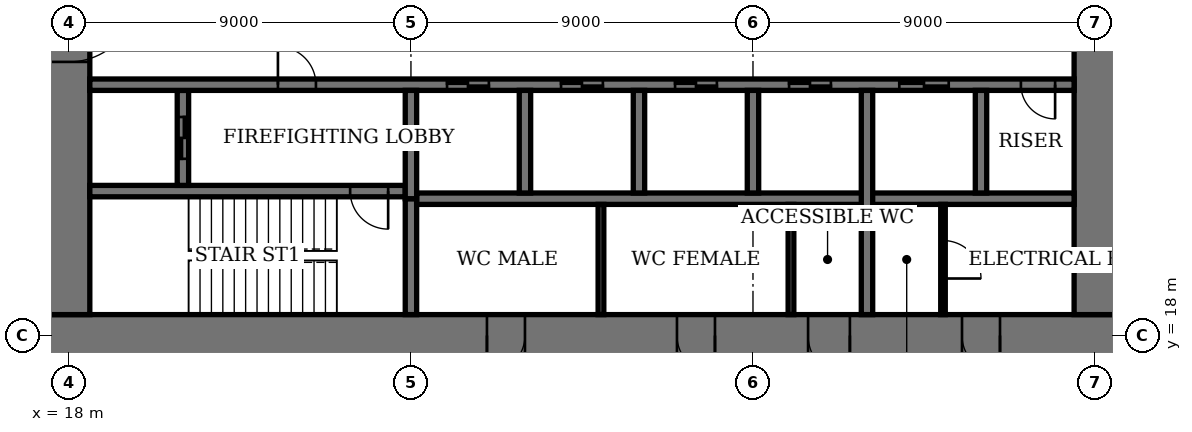
"""IFC4 building model, lengths in metres.
Left out: names, types, materials, properties, quantities, classifications, styles, units other than length and angle.
Written with IfcOpenShell. Run it as: python <this file> out.ifc"""

import sys

from ifc_helpers import new_model, si_unit, direction, frame, frame_2d, origin, place, context, subcontext, project, spatial, rectangle, extrude, element, fill, save


model = new_model("IFC4")
c1 = context("Model", 3, precision=1e-05, world=origin(), true_north=direction((0.0, 1.0)))
c2 = subcontext(c1, "Body", "Model", "MODEL_VIEW")
j1 = project(units=[si_unit("LENGTHUNIT", "METRE"), si_unit("PLANEANGLEUNIT", "RADIAN")], contexts=[c1])
p1 = place(None, origin())
s1 = spatial("IfcSite", under=j1, at=p1, CompositionType="ELEMENT")
p2 = place(p1, origin())
s2 = spatial("IfcBuilding", under=s1, at=p2, CompositionType="ELEMENT")
p3 = place(p2, frame((0.0, 0.0, 275.4)))
s3 = spatial("IfcBuildingStorey", under=s2, at=p3, CompositionType="ELEMENT", Elevation=275.4)
p4 = place(p3, frame((17.45, 18.0, 0.0), z_axis=(0.0, 0.0, 1.0), x_axis=(1.0, 0.0, 0.0)))
e1 = element("IfcWall", 1, at=p4, inside=s3, PredefinedType="SHEAR", context=c2, shape_type="SweptSolid", body=[
    extrude(rectangle(XDim=28.1, YDim=1.1, at=frame_2d((14.05, 0.0))), origin(), (0.0, 0.0, 1.0), 4.0),
])
p5 = place(p4, frame((11.55, 0.0, 0.0)))
e2 = element("IfcOpeningElement", 2, at=p5, cuts=e1, PredefinedType="OPENING", context=c2, shape_type="SweptSolid", body=[
    extrude(rectangle(XDim=1.0, YDim=2.4, at=frame_2d((0.5, 1.2))), frame((0.0, 0.56, 0.0), z_axis=(0.0, -1.0, 0.0), x_axis=(1.0, 0.0, 0.0)), (0.0, 0.0, 1.0), 1.12),
])
p6 = place(p4, frame((16.55, 0.0, 0.0)))
e3 = element("IfcOpeningElement", 3, at=p6, cuts=e1, PredefinedType="OPENING", context=c2, shape_type="SweptSolid", body=[
    extrude(rectangle(XDim=1.0, YDim=2.4, at=frame_2d((0.5, 1.2))), frame((0.0, 0.56, 0.0), z_axis=(0.0, -1.0, 0.0), x_axis=(1.0, 0.0, 0.0)), (0.0, 0.0, 1.0), 1.12),
])
p7 = place(p4, frame((20.0, 0.0, 0.0)))
e4 = element("IfcOpeningElement", 4, at=p7, cuts=e1, PredefinedType="OPENING", context=c2, shape_type="SweptSolid", body=[
    extrude(rectangle(XDim=1.1, YDim=2.4, at=frame_2d((0.55, 1.2))), frame((0.0, 0.56, 0.0), z_axis=(0.0, -1.0, 0.0), x_axis=(1.0, 0.0, 0.0)), (0.0, 0.0, 1.0), 1.12),
])
p8 = place(p4, frame((24.05, 0.0, 0.0)))
e5 = element("IfcOpeningElement", 5, at=p8, cuts=e1, PredefinedType="OPENING", context=c2, shape_type="SweptSolid", body=[
    extrude(rectangle(XDim=1.0, YDim=2.4, at=frame_2d((0.5, 1.2))), frame((0.0, 0.56, 0.0), z_axis=(0.0, -1.0, 0.0), x_axis=(1.0, 0.0, 0.0)), (0.0, 0.0, 1.0), 1.12),
])
p9 = place(p3, frame((18.0, 35.45, 0.0), z_axis=(0.0, 0.0, 1.0), x_axis=(0.0, -1.0, 0.0)))
e6 = element("IfcWall", 6, at=p9, inside=s3, PredefinedType="SHEAR", context=c2, shape_type="SweptSolid", body=[
    extrude(rectangle(XDim=16.9, YDim=1.1, at=frame_2d((8.45, 0.0))), origin(), (0.0, 0.0, 1.0), 4.0),
])
p10 = place(p9, frame((8.45, 0.0, 0.0)))
e7 = element("IfcOpeningElement", 7, at=p10, cuts=e6, PredefinedType="OPENING", context=c2, shape_type="SweptSolid", body=[
    extrude(rectangle(XDim=1.8, YDim=2.4, at=frame_2d((0.9, 1.2))), frame((0.0, 0.56, 0.0), z_axis=(0.0, -1.0, 0.0), x_axis=(1.0, 0.0, 0.0)), (0.0, 0.0, 1.0), 1.12),
])
p11 = place(p3, frame((45.0, 18.55, 0.0), z_axis=(0.0, 0.0, 1.0), x_axis=(0.0, 1.0, 0.0)))
e8 = element("IfcWall", 8, at=p11, inside=s3, PredefinedType="SHEAR", context=c2, shape_type="SweptSolid", body=[
    extrude(rectangle(XDim=16.9, YDim=1.1, at=frame_2d((8.45, 0.0))), origin(), (0.0, 0.0, 1.0), 4.0),
])
p12 = place(p11, frame((8.45, 0.0, 0.0)))
e9 = element("IfcOpeningElement", 9, at=p12, cuts=e8, PredefinedType="OPENING", context=c2, shape_type="SweptSolid", body=[
    extrude(rectangle(XDim=1.8, YDim=2.4, at=frame_2d((0.9, 1.2))), frame((0.0, 0.56, 0.0), z_axis=(0.0, -1.0, 0.0), x_axis=(1.0, 0.0, 0.0)), (0.0, 0.0, 1.0), 1.12),
])
p13 = place(p3, frame((18.55, 21.8, 0.0), z_axis=(0.0, 0.0, 1.0), x_axis=(1.0, 0.0, 0.0)))
e10 = element("IfcWall", 10, at=p13, inside=s3, PredefinedType="SHEAR", context=c2, shape_type="SweptSolid", body=[
    extrude(rectangle(XDim=8.3, YDim=0.3, at=frame_2d((4.15, 0.0))), origin(), (0.0, 0.0, 1.0), 4.0),
])
p14 = place(p13, frame((6.85, 0.0, 0.0)))
e11 = element("IfcOpeningElement", 11, at=p14, cuts=e10, PredefinedType="OPENING", context=c2, shape_type="SweptSolid", body=[
    extrude(rectangle(XDim=1.0, YDim=2.4, at=frame_2d((0.5, 1.2))), frame((0.0, 0.16, 0.0), z_axis=(0.0, -1.0, 0.0), x_axis=(1.0, 0.0, 0.0)), (0.0, 0.0, 1.0), 0.32),
])
p15 = place(p3, frame((27.0, 18.55, 0.0), z_axis=(0.0, 0.0, 1.0), x_axis=(0.0, 1.0, 0.0)))
e12 = element("IfcWall", 12, at=p15, inside=s3, PredefinedType="SHEAR", context=c2, shape_type="SweptSolid", body=[
    extrude(rectangle(XDim=3.05, YDim=0.3, at=frame_2d((1.525, 0.0))), origin(), (0.0, 0.0, 1.0), 4.0),
])
p16 = place(p3, frame((21.0, 21.95, 0.0), z_axis=(0.0, 0.0, 1.0), x_axis=(0.0, 1.0, 0.0)))
e13 = element("IfcWall", 13, at=p16, inside=s3, PredefinedType="SHEAR", context=c2, shape_type="SweptSolid", body=[
    extrude(rectangle(XDim=2.5, YDim=0.3, at=frame_2d((1.25, 0.0))), origin(), (0.0, 0.0, 1.0), 4.0),
])
p17 = place(p16, frame((0.7, 0.0, 0.0)))
e14 = element("IfcOpeningElement", 14, at=p17, cuts=e13, PredefinedType="OPENING", context=c2, shape_type="SweptSolid", body=[
    extrude(rectangle(XDim=1.1, YDim=2.4, at=frame_2d((0.55, 1.2))), frame((0.0, 0.16, 0.0), z_axis=(0.0, -1.0, 0.0), x_axis=(1.0, 0.0, 0.0)), (0.0, 0.0, 1.0), 0.32),
])
p18 = place(p3, frame((18.55, 24.6, 0.0), z_axis=(0.0, 0.0, 1.0), x_axis=(1.0, 0.0, 0.0)))
e15 = element("IfcWall", 15, at=p18, inside=s3, PredefinedType="SHEAR", context=c2, shape_type="SweptSolid", body=[
    extrude(rectangle(XDim=25.9, YDim=0.3, at=frame_2d((12.95, 0.0))), origin(), (0.0, 0.0, 1.0), 4.0),
])
p19 = place(p18, frame((4.95, 0.0, 0.0)))
e16 = element("IfcOpeningElement", 16, at=p19, cuts=e15, PredefinedType="OPENING", context=c2, shape_type="SweptSolid", body=[
    extrude(rectangle(XDim=1.0, YDim=2.4, at=frame_2d((0.5, 1.2))), frame((0.0, 0.16, 0.0), z_axis=(0.0, -1.0, 0.0), x_axis=(1.0, 0.0, 0.0)), (0.0, 0.0, 1.0), 0.32),
])
p20 = place(p18, frame((24.5, 0.0, 0.0)))
e17 = element("IfcOpeningElement", 17, at=p20, cuts=e15, PredefinedType="OPENING", context=c2, shape_type="SweptSolid", body=[
    extrude(rectangle(XDim=0.9, YDim=2.1, at=frame_2d((0.45, 1.05))), frame((0.0, 0.16, 0.0), z_axis=(0.0, -1.0, 0.0), x_axis=(1.0, 0.0, 0.0)), (0.0, 0.0, 1.0), 0.32),
])
p21 = place(p18, frame((9.4, 0.0, 0.0)))
e18 = element("IfcOpeningElement", 18, at=p21, cuts=e15, PredefinedType="OPENING", context=c2, shape_type="SweptSolid", body=[
    extrude(rectangle(XDim=1.1, YDim=2.4, at=frame_2d((0.55, 1.2))), frame((0.0, 0.16, 0.0), z_axis=(0.0, -1.0, 0.0), x_axis=(1.0, 0.0, 0.0)), (0.0, 0.0, 1.0), 0.32),
])
p22 = place(p18, frame((12.4, 0.0, 0.0)))
e19 = element("IfcOpeningElement", 19, at=p22, cuts=e15, PredefinedType="OPENING", context=c2, shape_type="SweptSolid", body=[
    extrude(rectangle(XDim=1.1, YDim=2.4, at=frame_2d((0.55, 1.2))), frame((0.0, 0.16, 0.0), z_axis=(0.0, -1.0, 0.0), x_axis=(1.0, 0.0, 0.0)), (0.0, 0.0, 1.0), 0.32),
])
p23 = place(p18, frame((15.4, 0.0, 0.0)))
e20 = element("IfcOpeningElement", 20, at=p23, cuts=e15, PredefinedType="OPENING", context=c2, shape_type="SweptSolid", body=[
    extrude(rectangle(XDim=1.1, YDim=2.4, at=frame_2d((0.55, 1.2))), frame((0.0, 0.16, 0.0), z_axis=(0.0, -1.0, 0.0), x_axis=(1.0, 0.0, 0.0)), (0.0, 0.0, 1.0), 0.32),
])
p24 = place(p18, frame((18.4, 0.0, 0.0)))
e21 = element("IfcOpeningElement", 21, at=p24, cuts=e15, PredefinedType="OPENING", context=c2, shape_type="SweptSolid", body=[
    extrude(rectangle(XDim=1.1, YDim=2.4, at=frame_2d((0.55, 1.2))), frame((0.0, 0.16, 0.0), z_axis=(0.0, -1.0, 0.0), x_axis=(1.0, 0.0, 0.0)), (0.0, 0.0, 1.0), 0.32),
])
p25 = place(p18, frame((21.3, 0.0, 0.0)))
e22 = element("IfcOpeningElement", 22, at=p25, cuts=e15, PredefinedType="OPENING", context=c2, shape_type="SweptSolid", body=[
    extrude(rectangle(XDim=1.3, YDim=2.4, at=frame_2d((0.65, 1.2))), frame((0.0, 0.16, 0.0), z_axis=(0.0, -1.0, 0.0), x_axis=(1.0, 0.0, 0.0)), (0.0, 0.0, 1.0), 0.32),
])
p26 = place(p3, frame((27.15, 21.6, 0.0), z_axis=(0.0, 0.0, 1.0), x_axis=(1.0, 0.0, 0.0)))
e23 = element("IfcWall", 23, at=p26, inside=s3, PredefinedType="SHEAR", context=c2, shape_type="SweptSolid", body=[
    extrude(rectangle(XDim=17.3, YDim=0.3, at=frame_2d((8.65, 0.0))), origin(), (0.0, 0.0, 1.0), 4.0),
])
for number, where, z_axis, x_axis in (
    (24, (30.0, 21.75, 0.0), (0.0, 0.0, 1.0), (0.0, 1.0, 0.0)),
    (25, (33.0, 21.75, 0.0), (0.0, 0.0, 1.0), (0.0, 1.0, 0.0)),
    (26, (36.0, 21.75, 0.0), (0.0, 0.0, 1.0), (0.0, 1.0, 0.0)),
):
    element("IfcWall", number, at=place(p3, frame(where, z_axis=z_axis, x_axis=x_axis)), inside=s3, PredefinedType="SHEAR", context=c2, shape_type="SweptSolid", body=[
        extrude(rectangle(XDim=2.7, YDim=0.3, at=frame_2d((1.35, 0.0))), origin(), (0.0, 0.0, 1.0), 4.0),
    ])
p27 = place(p3, frame((39.0, 18.55, 0.0), z_axis=(0.0, 0.0, 1.0), x_axis=(0.0, 1.0, 0.0)))
e27 = element("IfcWall", 27, at=p27, inside=s3, PredefinedType="SHEAR", context=c2, shape_type="SweptSolid", body=[
    extrude(rectangle(XDim=5.9, YDim=0.3, at=frame_2d((2.95, 0.0))), origin(), (0.0, 0.0, 1.0), 4.0),
])
p28 = place(p3, frame((42.0, 21.75, 0.0), z_axis=(0.0, 0.0, 1.0), x_axis=(0.0, 1.0, 0.0)))
e28 = element("IfcWall", 28, at=p28, inside=s3, PredefinedType="SHEAR", context=c2, shape_type="SweptSolid", body=[
    extrude(rectangle(XDim=2.7, YDim=0.3, at=frame_2d((1.35, 0.0))), origin(), (0.0, 0.0, 1.0), 4.0),
])
p29 = place(p3, frame((27.0, 21.6, 0.0), z_axis=(0.0, 0.0, 1.0), x_axis=(0.0, 1.0, 0.0)))
e29 = element("IfcWall", 29, at=p29, inside=s3, PredefinedType="SHEAR", context=c2, shape_type="SweptSolid", body=[
    extrude(rectangle(XDim=2.85, YDim=0.3, at=frame_2d((1.425, 0.0))), origin(), (0.0, 0.0, 1.0), 4.0),
])
for number, where, z_axis, x_axis in (
    (30, (32.0, 18.55, 0.0), (0.0, 0.0, 1.0), (0.0, 1.0, 0.0)),
    (31, (37.0, 18.55, 0.0), (0.0, 0.0, 1.0), (0.0, 1.0, 0.0)),
):
    element("IfcWall", number, at=place(p3, frame(where, z_axis=z_axis, x_axis=x_axis)), inside=s3, PredefinedType="PARTITIONING", context=c2, shape_type="SweptSolid", body=[
        extrude(rectangle(XDim=2.9, YDim=0.15, at=frame_2d((1.45, 0.0))), origin(), (0.0, 0.0, 1.0), 3.75),
    ])
p30 = place(p3, frame((41.0, 18.55, 0.0), z_axis=(0.0, 0.0, 1.0), x_axis=(0.0, 1.0, 0.0)))
e32 = element("IfcWall", 32, at=p30, inside=s3, PredefinedType="PARTITIONING", context=c2, shape_type="SweptSolid", body=[
    extrude(rectangle(XDim=2.9, YDim=0.12, at=frame_2d((1.45, 0.0))), origin(), (0.0, 0.0, 1.0), 3.75),
])
p31 = place(p30, frame((0.95, 0.0, 0.0)))
e33 = element("IfcOpeningElement", 33, at=p31, cuts=e32, PredefinedType="OPENING", context=c2, shape_type="SweptSolid", body=[
    extrude(rectangle(XDim=1.0, YDim=2.4, at=frame_2d((0.5, 1.2))), frame((0.0, 0.07, 0.0), z_axis=(0.0, -1.0, 0.0), x_axis=(1.0, 0.0, 0.0)), (0.0, 0.0, 1.0), 0.14),
])
p32 = place(p10, origin())
e34 = element("IfcDoor", 34, at=p32, inside=s3, OperationType="DOUBLE_DOOR_DOUBLE_SWING", PredefinedType="DOOR", context=c2, shape_type="SweptSolid", body=[
    extrude(rectangle(XDim=1.8, YDim=2.4, at=frame_2d((0.9, 1.2))), frame((0.0, 0.03, 0.0), z_axis=(0.0, -1.0, 0.0), x_axis=(1.0, 0.0, 0.0)), (0.0, 0.0, 1.0), 0.06),
    extrude(rectangle(XDim=0.04, YDim=2.4, at=frame_2d((0.02, 1.2))), frame((0.0, 0.55, 0.0), z_axis=(0.0, -1.0, 0.0), x_axis=(1.0, 0.0, 0.0)), (0.0, 0.0, 1.0), 1.1),
    extrude(rectangle(XDim=0.04, YDim=2.4, at=frame_2d((1.78, 1.2))), frame((0.0, 0.55, 0.0), z_axis=(0.0, -1.0, 0.0), x_axis=(1.0, 0.0, 0.0)), (0.0, 0.0, 1.0), 1.1),
    extrude(rectangle(XDim=1.8, YDim=0.04, at=frame_2d((0.9, 2.38))), frame((0.0, 0.55, 0.0), z_axis=(0.0, -1.0, 0.0), x_axis=(1.0, 0.0, 0.0)), (0.0, 0.0, 1.0), 1.1),
])
fill(e7, e34)
p33 = place(p5, origin())
e35 = element("IfcDoor", 35, at=p33, inside=s3, OperationType="SINGLE_SWING_LEFT", PredefinedType="DOOR", context=c2, shape_type="SweptSolid", body=[
    extrude(rectangle(XDim=1.0, YDim=2.4, at=frame_2d((0.5, 1.2))), frame((0.0, 0.025, 0.0), z_axis=(0.0, -1.0, 0.0), x_axis=(1.0, 0.0, 0.0)), (0.0, 0.0, 1.0), 0.05),
    extrude(rectangle(XDim=0.04, YDim=2.4, at=frame_2d((0.02, 1.2))), frame((0.0, 0.4, 0.0), z_axis=(0.0, -1.0, 0.0), x_axis=(1.0, 0.0, 0.0)), (0.0, 0.0, 1.0), 0.8),
    extrude(rectangle(XDim=0.04, YDim=2.4, at=frame_2d((0.98, 1.2))), frame((0.0, 0.4, 0.0), z_axis=(0.0, -1.0, 0.0), x_axis=(1.0, 0.0, 0.0)), (0.0, 0.0, 1.0), 0.8),
    extrude(rectangle(XDim=1.0, YDim=0.04, at=frame_2d((0.5, 2.38))), frame((0.0, 0.4, 0.0), z_axis=(0.0, -1.0, 0.0), x_axis=(1.0, 0.0, 0.0)), (0.0, 0.0, 1.0), 0.8),
])
fill(e2, e35)
p34 = place(p6, origin())
e36 = element("IfcDoor", 36, at=p34, inside=s3, OperationType="SINGLE_SWING_RIGHT", PredefinedType="DOOR", context=c2, shape_type="SweptSolid", body=[
    extrude(rectangle(XDim=1.0, YDim=2.4, at=frame_2d((0.5, 1.2))), frame((0.0, 0.025, 0.0), z_axis=(0.0, -1.0, 0.0), x_axis=(1.0, 0.0, 0.0)), (0.0, 0.0, 1.0), 0.05),
    extrude(rectangle(XDim=0.04, YDim=2.4, at=frame_2d((0.02, 1.2))), frame((0.0, 0.4, 0.0), z_axis=(0.0, -1.0, 0.0), x_axis=(1.0, 0.0, 0.0)), (0.0, 0.0, 1.0), 0.8),
    extrude(rectangle(XDim=0.04, YDim=2.4, at=frame_2d((0.98, 1.2))), frame((0.0, 0.4, 0.0), z_axis=(0.0, -1.0, 0.0), x_axis=(1.0, 0.0, 0.0)), (0.0, 0.0, 1.0), 0.8),
    extrude(rectangle(XDim=1.0, YDim=0.04, at=frame_2d((0.5, 2.38))), frame((0.0, 0.4, 0.0), z_axis=(0.0, -1.0, 0.0), x_axis=(1.0, 0.0, 0.0)), (0.0, 0.0, 1.0), 0.8),
])
fill(e3, e36)
p35 = place(p7, origin())
e37 = element("IfcDoor", 37, at=p35, inside=s3, OperationType="SINGLE_SWING_RIGHT", PredefinedType="DOOR", context=c2, shape_type="SweptSolid", body=[
    extrude(rectangle(XDim=1.1, YDim=2.4, at=frame_2d((0.55, 1.2))), frame((0.0, 0.025, 0.0), z_axis=(0.0, -1.0, 0.0), x_axis=(1.0, 0.0, 0.0)), (0.0, 0.0, 1.0), 0.05),
    extrude(rectangle(XDim=0.04, YDim=2.4, at=frame_2d((0.02, 1.2))), frame((0.0, 0.44, 0.0), z_axis=(0.0, -1.0, 0.0), x_axis=(1.0, 0.0, 0.0)), (0.0, 0.0, 1.0), 0.88),
    extrude(rectangle(XDim=0.04, YDim=2.4, at=frame_2d((1.08, 1.2))), frame((0.0, 0.44, 0.0), z_axis=(0.0, -1.0, 0.0), x_axis=(1.0, 0.0, 0.0)), (0.0, 0.0, 1.0), 0.88),
    extrude(rectangle(XDim=1.1, YDim=0.04, at=frame_2d((0.55, 2.38))), frame((0.0, 0.44, 0.0), z_axis=(0.0, -1.0, 0.0), x_axis=(1.0, 0.0, 0.0)), (0.0, 0.0, 1.0), 0.88),
])
fill(e4, e37)
p36 = place(p8, origin())
e38 = element("IfcDoor", 38, at=p36, inside=s3, OperationType="SINGLE_SWING_RIGHT", PredefinedType="DOOR", context=c2, shape_type="SweptSolid", body=[
    extrude(rectangle(XDim=1.0, YDim=2.4, at=frame_2d((0.5, 1.2))), frame((0.0, 0.025, 0.0), z_axis=(0.0, -1.0, 0.0), x_axis=(1.0, 0.0, 0.0)), (0.0, 0.0, 1.0), 0.05),
    extrude(rectangle(XDim=0.04, YDim=2.4, at=frame_2d((0.02, 1.2))), frame((0.0, 0.4, 0.0), z_axis=(0.0, -1.0, 0.0), x_axis=(1.0, 0.0, 0.0)), (0.0, 0.0, 1.0), 0.8),
    extrude(rectangle(XDim=0.04, YDim=2.4, at=frame_2d((0.98, 1.2))), frame((0.0, 0.4, 0.0), z_axis=(0.0, -1.0, 0.0), x_axis=(1.0, 0.0, 0.0)), (0.0, 0.0, 1.0), 0.8),
    extrude(rectangle(XDim=1.0, YDim=0.04, at=frame_2d((0.5, 2.38))), frame((0.0, 0.4, 0.0), z_axis=(0.0, -1.0, 0.0), x_axis=(1.0, 0.0, 0.0)), (0.0, 0.0, 1.0), 0.8),
])
fill(e5, e38)
p37 = place(p14, origin())
e39 = element("IfcDoor", 39, at=p37, inside=s3, OperationType="SINGLE_SWING_RIGHT", PredefinedType="DOOR", context=c2, shape_type="SweptSolid", body=[
    extrude(rectangle(XDim=1.0, YDim=2.4, at=frame_2d((0.5, 1.2))), frame((0.0, 0.03, 0.0), z_axis=(0.0, -1.0, 0.0), x_axis=(1.0, 0.0, 0.0)), (0.0, 0.0, 1.0), 0.06),
])
fill(e11, e39)
p38 = place(p19, origin())
e40 = element("IfcDoor", 40, at=p38, inside=s3, OperationType="SINGLE_SWING_RIGHT", PredefinedType="DOOR", context=c2, shape_type="SweptSolid", body=[
    extrude(rectangle(XDim=1.0, YDim=2.4, at=frame_2d((0.5, 1.2))), frame((0.0, 0.03, 0.0), z_axis=(0.0, -1.0, 0.0), x_axis=(1.0, 0.0, 0.0)), (0.0, 0.0, 1.0), 0.06),
])
fill(e16, e40)
p39 = place(p20, origin())
e41 = element("IfcDoor", 41, at=p39, inside=s3, OperationType="SINGLE_SWING_RIGHT", PredefinedType="DOOR", context=c2, shape_type="SweptSolid", body=[
    extrude(rectangle(XDim=0.9, YDim=2.1, at=frame_2d((0.45, 1.05))), frame((0.0, 0.03, 0.0), z_axis=(0.0, -1.0, 0.0), x_axis=(1.0, 0.0, 0.0)), (0.0, 0.0, 1.0), 0.06),
])
fill(e17, e41)
p40 = place(p31, origin())
e42 = element("IfcDoor", 42, at=p40, inside=s3, OperationType="SINGLE_SWING_LEFT", PredefinedType="DOOR", context=c2, shape_type="SweptSolid", body=[
    extrude(rectangle(XDim=1.0, YDim=2.4, at=frame_2d((0.5, 1.2))), frame((0.0, 0.03, 0.0), z_axis=(0.0, -1.0, 0.0), x_axis=(1.0, 0.0, 0.0)), (0.0, 0.0, 1.0), 0.06),
])
fill(e33, e42)
p41 = place(p21, origin())
e43 = element("IfcDoor", 43, at=p41, inside=s3, OperationType="DOUBLE_DOOR_SLIDING", PredefinedType="DOOR", context=c2, shape_type="SweptSolid", body=[
    extrude(rectangle(XDim=1.1, YDim=2.4, at=frame_2d((0.55, 1.2))), frame((0.0, 0.02, 0.0), z_axis=(0.0, -1.0, 0.0), x_axis=(1.0, 0.0, 0.0)), (0.0, 0.0, 1.0), 0.04),
])
fill(e18, e43)
p42 = place(p22, origin())
e44 = element("IfcDoor", 44, at=p42, inside=s3, OperationType="DOUBLE_DOOR_SLIDING", PredefinedType="DOOR", context=c2, shape_type="SweptSolid", body=[
    extrude(rectangle(XDim=1.1, YDim=2.4, at=frame_2d((0.55, 1.2))), frame((0.0, 0.02, 0.0), z_axis=(0.0, -1.0, 0.0), x_axis=(1.0, 0.0, 0.0)), (0.0, 0.0, 1.0), 0.04),
])
fill(e19, e44)
p43 = place(p23, origin())
e45 = element("IfcDoor", 45, at=p43, inside=s3, OperationType="DOUBLE_DOOR_SLIDING", PredefinedType="DOOR", context=c2, shape_type="SweptSolid", body=[
    extrude(rectangle(XDim=1.1, YDim=2.4, at=frame_2d((0.55, 1.2))), frame((0.0, 0.02, 0.0), z_axis=(0.0, -1.0, 0.0), x_axis=(1.0, 0.0, 0.0)), (0.0, 0.0, 1.0), 0.04),
])
fill(e20, e45)
p44 = place(p24, origin())
e46 = element("IfcDoor", 46, at=p44, inside=s3, OperationType="DOUBLE_DOOR_SLIDING", PredefinedType="DOOR", context=c2, shape_type="SweptSolid", body=[
    extrude(rectangle(XDim=1.1, YDim=2.4, at=frame_2d((0.55, 1.2))), frame((0.0, 0.02, 0.0), z_axis=(0.0, -1.0, 0.0), x_axis=(1.0, 0.0, 0.0)), (0.0, 0.0, 1.0), 0.04),
])
fill(e21, e46)
p45 = place(p25, origin())
e47 = element("IfcDoor", 47, at=p45, inside=s3, OperationType="DOUBLE_DOOR_SLIDING", PredefinedType="DOOR", context=c2, shape_type="SweptSolid", body=[
    extrude(rectangle(XDim=1.3, YDim=2.4, at=frame_2d((0.65, 1.2))), frame((0.0, 0.02, 0.0), z_axis=(0.0, -1.0, 0.0), x_axis=(1.0, 0.0, 0.0)), (0.0, 0.0, 1.0), 0.04),
])
fill(e22, e47)
p46 = place(p17, origin())
e48 = element("IfcDoor", 48, at=p46, inside=s3, OperationType="DOUBLE_DOOR_SLIDING", PredefinedType="DOOR", context=c2, shape_type="SweptSolid", body=[
    extrude(rectangle(XDim=1.1, YDim=2.4, at=frame_2d((0.55, 1.2))), frame((0.0, 0.03, 0.0), z_axis=(0.0, -1.0, 0.0), x_axis=(1.0, 0.0, 0.0)), (0.0, 0.0, 1.0), 0.06),
])
fill(e14, e48)
save(model, sys.argv[1])
